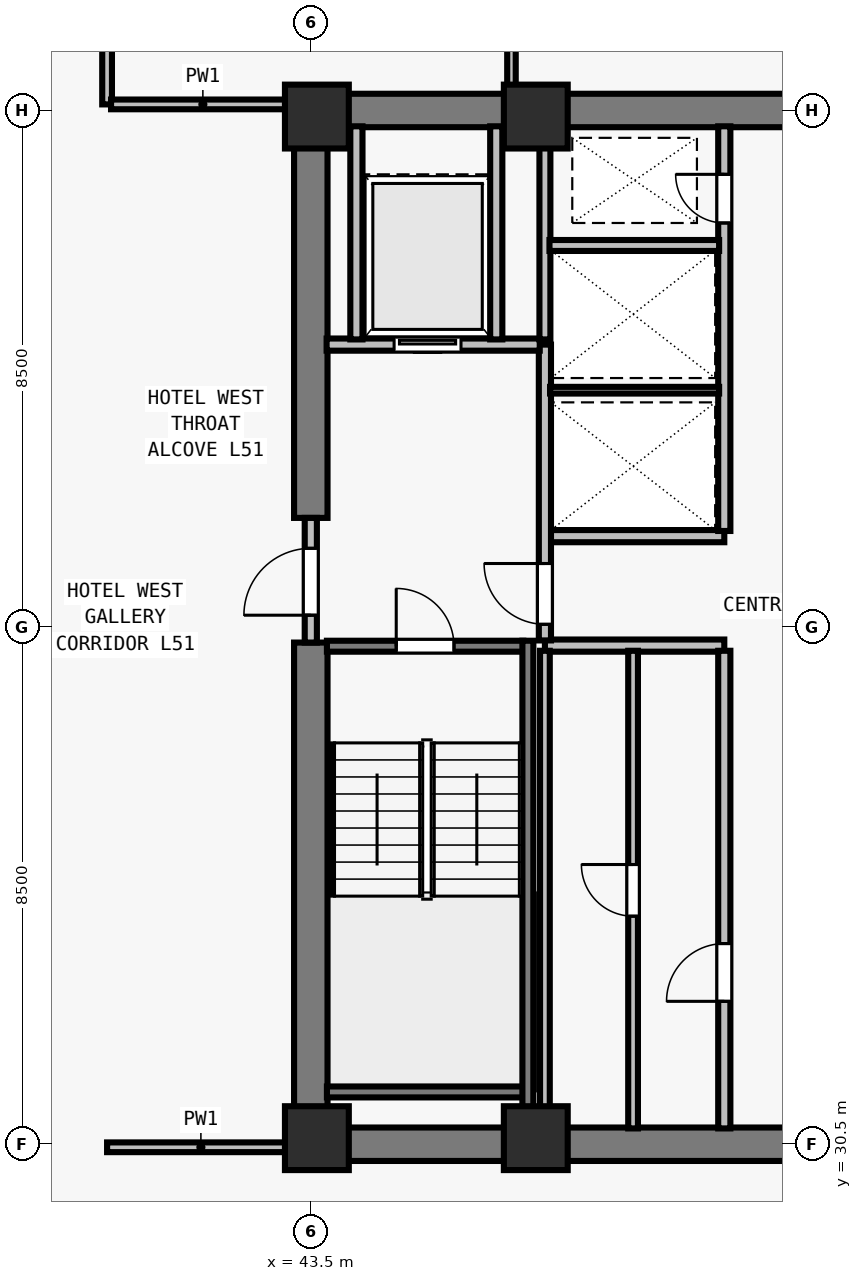
"""IFC4 building model, lengths in metres.
Left out: names, types, materials, properties, quantities, classifications, styles, units other than length and angle.
Written with IfcOpenShell. Run it as: python <this file> out.ifc"""

import sys

from ifc_helpers import new_model, si_unit, direction, frame, frame_2d, origin, origin_2d, place, context, subcontext, project, spatial, rectangle, extrude, element, fill, save


model = new_model("IFC4")
c1 = context("Model", 3, precision=1e-05, world=origin(), true_north=direction((0.0, 1.0)))
c2 = subcontext(c1, "Body", "Model", "MODEL_VIEW")
j1 = project(units=[si_unit("LENGTHUNIT", "METRE"), si_unit("PLANEANGLEUNIT", "RADIAN")], contexts=[c1])
p1 = place(None, origin())
s1 = spatial("IfcSite", under=j1, at=p1, CompositionType="ELEMENT")
p2 = place(p1, origin())
s2 = spatial("IfcBuilding", under=s1, at=p2, CompositionType="ELEMENT")
p3 = place(p2, frame((0.0, 0.0, 186.5)))
s3 = spatial("IfcBuildingStorey", under=s2, at=p3, CompositionType="ELEMENT", Elevation=186.5)
for number, where, z_axis, x_axis in (
    (1, (43.6, 30.6, 0.0), (0.0, 0.0, 1.0), (1.0, 0.0, 0.0)),
    (2, (47.2, 30.6, 0.0), (0.0, 0.0, 1.0), (1.0, 0.0, 0.0)),
    (3, (43.6, 47.4, 0.0), (0.0, 0.0, 1.0), (1.0, 0.0, 0.0)),
    (4, (47.2, 47.4, 0.0), (0.0, 0.0, 1.0), (1.0, 0.0, 0.0)),
):
    element("IfcColumn", number, at=place(p3, frame(where, z_axis=z_axis, x_axis=x_axis)), inside=s3, PredefinedType="COLUMN", context=c2, shape_type="SweptSolid", body=[
        extrude(rectangle(XDim=1.05, YDim=1.05, at=origin_2d()), origin(), (0.0, 0.0, 1.0), 3.5),
    ])
for number, where, z_axis, x_axis in (
    (5, (43.225, 30.5, 0.0), (0.0, 0.0, 1.0), (1.0, 0.0, 0.0)),
    (6, (43.225, 47.5, 0.0), (0.0, 0.0, 1.0), (1.0, 0.0, 0.0)),
):
    element("IfcWall", number, at=place(p3, frame(where, z_axis=z_axis, x_axis=x_axis)), inside=s3, PredefinedType="SHEAR", context=c2, shape_type="SweptSolid", body=[
        extrude(rectangle(XDim=17.55, YDim=0.55, at=frame_2d((8.775, 0.0))), origin(), (0.0, 0.0, 1.0), 3.28),
    ])
p4 = place(p3, frame((43.5, 30.765, 0.0), z_axis=(0.0, 0.0, 1.0), x_axis=(0.0, 1.0, 0.0)))
e7 = element("IfcWall", 7, at=p4, inside=s3, PredefinedType="SHEAR", context=c2, shape_type="SweptSolid", body=[
    extrude(rectangle(XDim=7.985, YDim=0.55, at=frame_2d((3.993, 0.0))), origin(), (0.0, 0.0, 1.0), 3.28),
])
p5 = place(p3, frame((43.5, 40.8, 0.0), z_axis=(0.0, 0.0, 1.0), x_axis=(0.0, 1.0, 0.0)))
e8 = element("IfcWall", 8, at=p5, inside=s3, PredefinedType="SHEAR", context=c2, shape_type="SweptSolid", body=[
    extrude(rectangle(XDim=6.435, YDim=0.55, at=frame_2d((3.218, 0.0))), origin(), (0.0, 0.0, 1.0), 3.28),
])
for number, where, z_axis, x_axis in (
    (9, (47.35, 38.7, 0.0), (0.0, 0.0, 1.0), (1.0, 0.0, 0.0)),
    (10, (47.35, 40.5, 0.0), (0.0, 0.0, 1.0), (1.0, 0.0, 0.0)),
):
    element("IfcWall", number, at=place(p3, frame(where, z_axis=z_axis, x_axis=x_axis)), inside=s3, PredefinedType="SOLIDWALL", context=c2, shape_type="SweptSolid", body=[
        extrude(rectangle(XDim=2.95, YDim=0.2, at=frame_2d((1.475, 0.0))), origin(), (0.0, 0.0, 1.0), 3.28),
    ])
p6 = place(p3, frame((50.3, 30.76, 0.0), z_axis=(0.0, 0.0, 1.0), x_axis=(0.0, 1.0, 0.0)))
e11 = element("IfcWall", 11, at=p6, inside=s3, PredefinedType="SOLIDWALL", context=c2, shape_type="SweptSolid", body=[
    extrude(rectangle(XDim=7.855, YDim=0.2, at=frame_2d((3.927, 0.0))), origin(), (0.0, 0.0, 1.0), 3.28),
])
p7 = place(p6, frame((2.09, 0.0, 0.0)))
e12 = element("IfcOpeningElement", 12, at=p7, cuts=e11, PredefinedType="OPENING", context=c2, shape_type="SweptSolid", body=[
    extrude(rectangle(XDim=0.95, YDim=2.12, at=frame_2d((0.475, 1.06))), frame((0.0, 0.11, 0.0), z_axis=(0.0, -1.0, 0.0), x_axis=(1.0, 0.0, 0.0)), (0.0, 0.0, 1.0), 0.22),
])
p8 = place(p3, frame((50.3, 40.585, 0.0), z_axis=(0.0, 0.0, 1.0), x_axis=(0.0, 1.0, 0.0)))
e13 = element("IfcWall", 13, at=p8, inside=s3, PredefinedType="SOLIDWALL", context=c2, shape_type="SweptSolid", body=[
    extrude(rectangle(XDim=6.655, YDim=0.2, at=frame_2d((3.328, 0.0))), origin(), (0.0, 0.0, 1.0), 3.28),
])
p9 = place(p8, frame((5.065, 0.0, 0.0)))
e14 = element("IfcOpeningElement", 14, at=p9, cuts=e13, PredefinedType="OPENING", context=c2, shape_type="SweptSolid", body=[
    extrude(rectangle(XDim=0.8, YDim=2.08, at=frame_2d((0.4, 1.04))), frame((0.0, 0.11, 0.0), z_axis=(0.0, -1.0, 0.0), x_axis=(1.0, 0.0, 0.0)), (0.0, 0.0, 1.0), 0.22),
])
p10 = place(p3, frame((43.5, 38.75, 0.0), z_axis=(0.0, 0.0, 1.0), x_axis=(0.0, 1.0, 0.0)))
e15 = element("IfcWall", 15, at=p10, inside=s3, PredefinedType="SOLIDWALL", context=c2, shape_type="SweptSolid", body=[
    extrude(rectangle(XDim=2.05, YDim=0.2, at=frame_2d((1.025, 0.0))), origin(), (0.0, 0.0, 1.0), 3.28),
])
p11 = place(p10, frame((0.45, 0.0, 0.0)))
e16 = element("IfcOpeningElement", 16, at=p11, cuts=e15, PredefinedType="OPENING", context=c2, shape_type="SweptSolid", body=[
    extrude(rectangle(XDim=1.1, YDim=2.15, at=frame_2d((0.55, 1.075))), frame((0.0, 0.11, 0.0), z_axis=(0.0, -1.0, 0.0), x_axis=(1.0, 0.0, 0.0)), (0.0, 0.0, 1.0), 0.22),
])
p12 = place(p3, frame((47.35, 38.785, 0.0), z_axis=(0.0, 0.0, 1.0), x_axis=(0.0, 1.0, 0.0)))
e17 = element("IfcWall", 17, at=p12, inside=s3, PredefinedType="SOLIDWALL", context=c2, shape_type="SweptSolid", body=[
    extrude(rectangle(XDim=4.865, YDim=0.2, at=frame_2d((2.433, 0.0))), origin(), (0.0, 0.0, 1.0), 3.28),
])
p13 = place(p12, frame((0.265, 0.0, 0.0)))
e18 = element("IfcOpeningElement", 18, at=p13, cuts=e17, PredefinedType="OPENING", context=c2, shape_type="SweptSolid", body=[
    extrude(rectangle(XDim=1.0, YDim=2.15, at=frame_2d((0.5, 1.075))), frame((0.0, 0.11, 0.0), z_axis=(0.0, -1.0, 0.0), x_axis=(1.0, 0.0, 0.0)), (0.0, 0.0, 1.0), 0.22),
])
p14 = place(p3, frame((43.76, 43.65, 0.0), z_axis=(0.0, 0.0, 1.0), x_axis=(1.0, 0.0, 0.0)))
e19 = element("IfcWall", 19, at=p14, inside=s3, PredefinedType="SOLIDWALL", context=c2, shape_type="SweptSolid", body=[
    extrude(rectangle(XDim=3.505, YDim=0.2, at=frame_2d((1.752, 0.0))), origin(), (0.0, 0.0, 1.0), 3.28),
])
p15 = place(p14, frame((1.11, 0.0, 0.0)))
e20 = element("IfcOpeningElement", 20, at=p15, cuts=e19, PredefinedType="OPENING", context=c2, shape_type="SweptSolid", body=[
    extrude(rectangle(XDim=1.1, YDim=2.2, at=frame_2d((0.55, 1.1))), frame((0.0, 0.11, 0.0), z_axis=(0.0, -1.0, 0.0), x_axis=(1.0, 0.0, 0.0)), (0.0, 0.0, 1.0), 0.22),
])
for number, where, z_axis, x_axis in (
    (21, (46.55, 43.735, 0.0), (0.0, 0.0, 1.0), (0.0, 1.0, 0.0)),
    (22, (44.25, 43.735, 0.0), (0.0, 0.0, 1.0), (0.0, 1.0, 0.0)),
):
    element("IfcWall", number, at=place(p3, frame(where, z_axis=z_axis, x_axis=x_axis)), inside=s3, PredefinedType="SOLIDWALL", context=c2, shape_type="SweptSolid", body=[
        extrude(rectangle(XDim=3.505, YDim=0.2, at=frame_2d((1.752, 0.0))), origin(), (0.0, 0.0, 1.0), 3.28),
    ])
p16 = place(p3, frame((47.35, 30.76, 0.0), z_axis=(0.0, 0.0, 1.0), x_axis=(0.0, 1.0, 0.0)))
e23 = element("IfcWall", 23, at=p16, inside=s3, PredefinedType="PARTITIONING", context=c2, shape_type="SweptSolid", body=[
    extrude(rectangle(XDim=7.855, YDim=0.16, at=frame_2d((3.927, 0.0))), origin(), (0.0, 0.0, 1.0), 3.28),
])
p17 = place(p3, frame((48.8, 30.76, 0.0), z_axis=(0.0, 0.0, 1.0), x_axis=(0.0, 1.0, 0.0)))
e24 = element("IfcWall", 24, at=p17, inside=s3, PredefinedType="PARTITIONING", context=c2, shape_type="SweptSolid", body=[
    extrude(rectangle(XDim=7.855, YDim=0.16, at=frame_2d((3.927, 0.0))), origin(), (0.0, 0.0, 1.0), 3.28),
])
p18 = place(p17, frame((3.49, 0.0, 0.0)))
e25 = element("IfcOpeningElement", 25, at=p18, cuts=e24, PredefinedType="OPENING", context=c2, shape_type="SweptSolid", body=[
    extrude(rectangle(XDim=0.85, YDim=2.12, at=frame_2d((0.425, 1.06))), frame((0.0, 0.09, 0.0), z_axis=(0.0, -1.0, 0.0), x_axis=(1.0, 0.0, 0.0)), (0.0, 0.0, 1.0), 0.18),
])
p19 = place(p3, frame((47.35, 43.735, 0.0), z_axis=(0.0, 0.0, 1.0), x_axis=(0.0, 1.0, 0.0)))
e26 = element("IfcWall", 26, at=p19, inside=s3, PredefinedType="SOLIDWALL", context=c2, shape_type="SweptSolid", body=[
    extrude(rectangle(XDim=3.505, YDim=0.18, at=frame_2d((1.752, 0.0))), origin(), (0.0, 0.0, 1.0), 3.28),
])
p20 = place(p3, frame((47.435, 42.9, 0.0), z_axis=(0.0, 0.0, 1.0), x_axis=(1.0, 0.0, 0.0)))
e27 = element("IfcWall", 27, at=p20, inside=s3, PredefinedType="PARTITIONING", context=c2, shape_type="SweptSolid", body=[
    extrude(rectangle(XDim=2.78, YDim=0.11, at=frame_2d((1.39, 0.0))), origin(), (0.0, 0.0, 1.0), 3.28),
])
p21 = place(p3, frame((47.425, 45.28, 0.0), z_axis=(0.0, 0.0, 1.0), x_axis=(1.0, 0.0, 0.0)))
e28 = element("IfcWall", 28, at=p21, inside=s3, PredefinedType="SOLIDWALL", context=c2, shape_type="SweptSolid", body=[
    extrude(rectangle(XDim=2.79, YDim=0.18, at=frame_2d((1.395, 0.0))), origin(), (0.0, 0.0, 1.0), 3.28),
])
p22 = place(p3, frame((40.15, 47.6, 0.0), z_axis=(0.0, 0.0, 1.0), x_axis=(0.0, 1.0, 0.0)))
e29 = element("IfcWall", 29, at=p22, inside=s3, PredefinedType="PARTITIONING", context=c2, shape_type="SweptSolid", body=[
    extrude(rectangle(XDim=15.075, YDim=0.16, at=frame_2d((7.538, 0.0))), origin(), (0.0, 0.0, 1.0), 2.555),
])
p23 = place(p22, frame((3.2, 0.0, 0.0)))
e30 = element("IfcOpeningElement", 30, at=p23, cuts=e29, PredefinedType="OPENING", context=c2, shape_type="SweptSolid", body=[
    extrude(rectangle(XDim=0.96, YDim=2.12, at=frame_2d((0.48, 1.06))), frame((0.0, 0.09, 0.0), z_axis=(0.0, -1.0, 0.0), x_axis=(1.0, 0.0, 0.0)), (0.0, 0.0, 1.0), 0.18),
])
p24 = place(p3, frame((40.15, 30.45, 0.0), z_axis=(0.0, 0.0, 1.0), x_axis=(1.0, 0.0, 0.0)))
e31 = element("IfcWall", 31, at=p24, inside=s3, PredefinedType="PARTITIONING", context=c2, shape_type="SweptSolid", body=[
    extrude(rectangle(XDim=3.085, YDim=0.16, at=frame_2d((1.542, 0.0))), origin(), (0.0, 0.0, 1.0), 3.28),
])
p25 = place(p3, frame((40.215, 47.6, 0.0), z_axis=(0.0, 0.0, 1.0), x_axis=(1.0, 0.0, 0.0)))
e32 = element("IfcWall", 32, at=p25, inside=s3, PredefinedType="PARTITIONING", context=c2, shape_type="SweptSolid", body=[
    extrude(rectangle(XDim=3.02, YDim=0.16, at=frame_2d((1.51, 0.0))), origin(), (0.0, 0.0, 1.0), 3.28),
])
p26 = place(p3, frame((46.8, 47.76, 0.0), z_axis=(0.0, 0.0, 1.0), x_axis=(0.0, 1.0, 0.0)))
e33 = element("IfcWall", 33, at=p26, inside=s3, PredefinedType="PARTITIONING", context=c2, shape_type="SweptSolid", body=[
    extrude(rectangle(XDim=14.915, YDim=0.14, at=frame_2d((7.458, 0.0))), origin(), (0.0, 0.0, 1.0), 3.28),
])
p27 = place(p26, frame((2.34, 0.0, 0.0)))
e34 = element("IfcOpeningElement", 34, at=p27, cuts=e33, PredefinedType="OPENING", context=c2, shape_type="SweptSolid", body=[
    extrude(rectangle(XDim=0.92, YDim=2.12, at=frame_2d((0.46, 1.06))), frame((0.0, 0.08, 0.0), z_axis=(0.0, -1.0, 0.0), x_axis=(1.0, 0.0, 0.0)), (0.0, 0.0, 1.0), 0.16),
])
p28 = place(p3, frame((43.765, 38.69, 0.0), z_axis=(0.0, 0.0, 1.0), x_axis=(1.0, 0.0, 0.0)))
e35 = element("IfcWall", 35, at=p28, inside=s3, PredefinedType="SOLIDWALL", context=c2, shape_type="SweptSolid", body=[
    extrude(rectangle(XDim=3.23, YDim=0.18, at=frame_2d((1.615, 0.0))), origin(), (0.0, 0.0, 1.0), 3.28),
])
p29 = place(p28, frame((1.14, 0.0, 0.0)))
e36 = element("IfcOpeningElement", 36, at=p29, cuts=e35, PredefinedType="OPENING", context=c2, shape_type="SweptSolid", body=[
    extrude(rectangle(XDim=0.95, YDim=2.15, at=frame_2d((0.475, 1.075))), frame((0.0, 0.1, 0.0), z_axis=(0.0, -1.0, 0.0), x_axis=(1.0, 0.0, 0.0)), (0.0, 0.0, 1.0), 0.2),
])
p30 = place(p3, frame((43.765, 31.36, 0.0), z_axis=(0.0, 0.0, 1.0), x_axis=(1.0, 0.0, 0.0)))
e37 = element("IfcWall", 37, at=p30, inside=s3, PredefinedType="SOLIDWALL", context=c2, shape_type="SweptSolid", body=[
    extrude(rectangle(XDim=3.23, YDim=0.18, at=frame_2d((1.615, 0.0))), origin(), (0.0, 0.0, 1.0), 3.28),
])
p31 = place(p3, frame((47.07, 38.78, 0.0), z_axis=(0.0, 0.0, 1.0), x_axis=(0.0, -1.0, 0.0)))
e38 = element("IfcWall", 38, at=p31, inside=s3, PredefinedType="SOLIDWALL", context=c2, shape_type="SweptSolid", body=[
    extrude(rectangle(XDim=8.017, YDim=0.18, at=frame_2d((4.009, 0.0))), origin(), (0.0, 0.0, 1.0), 3.28),
])
p32 = place(p11, origin())
e39 = element("IfcDoor", 39, at=p32, inside=s3, OperationType="SINGLE_SWING_LEFT", PredefinedType="DOOR", context=c2, shape_type="SweptSolid", body=[
    extrude(rectangle(XDim=1.1, YDim=2.15, at=frame_2d((0.55, 1.075))), frame((0.0, 0.025, 0.0), z_axis=(0.0, -1.0, 0.0), x_axis=(1.0, 0.0, 0.0)), (0.0, 0.0, 1.0), 0.05),
])
fill(e16, e39)
p33 = place(p13, origin())
e40 = element("IfcDoor", 40, at=p33, inside=s3, OperationType="SINGLE_SWING_RIGHT", PredefinedType="DOOR", context=c2, shape_type="SweptSolid", body=[
    extrude(rectangle(XDim=1.0, YDim=2.15, at=frame_2d((0.5, 1.075))), frame((0.0, 0.025, 0.0), z_axis=(0.0, -1.0, 0.0), x_axis=(1.0, 0.0, 0.0)), (0.0, 0.0, 1.0), 0.05),
])
fill(e18, e40)
p34 = place(p15, origin())
e41 = element("IfcDoor", 41, at=p34, inside=s3, OperationType="SLIDING_TO_LEFT", PredefinedType="DOOR", context=c2, shape_type="SweptSolid", body=[
    extrude(rectangle(XDim=1.1, YDim=2.2, at=frame_2d((0.55, 1.1))), frame((0.0, 0.025, 0.0), z_axis=(0.0, -1.0, 0.0), x_axis=(1.0, 0.0, 0.0)), (0.0, 0.0, 1.0), 0.05),
])
fill(e20, e41)
p35 = place(p7, origin())
e42 = element("IfcDoor", 42, at=p35, inside=s3, OperationType="SINGLE_SWING_LEFT", PredefinedType="DOOR", context=c2, shape_type="SweptSolid", body=[
    extrude(rectangle(XDim=0.95, YDim=2.12, at=frame_2d((0.475, 1.06))), frame((0.0, 0.025, 0.0), z_axis=(0.0, -1.0, 0.0), x_axis=(1.0, 0.0, 0.0)), (0.0, 0.0, 1.0), 0.05),
])
fill(e12, e42)
p36 = place(p18, origin())
e43 = element("IfcDoor", 43, at=p36, inside=s3, OperationType="SINGLE_SWING_RIGHT", PredefinedType="DOOR", context=c2, shape_type="SweptSolid", body=[
    extrude(rectangle(XDim=0.85, YDim=2.12, at=frame_2d((0.425, 1.06))), frame((0.0, 0.025, 0.0), z_axis=(0.0, -1.0, 0.0), x_axis=(1.0, 0.0, 0.0)), (0.0, 0.0, 1.0), 0.05),
])
fill(e25, e43)
p37 = place(p9, origin())
e44 = element("IfcDoor", 44, at=p37, inside=s3, OperationType="SINGLE_SWING_RIGHT", PredefinedType="DOOR", context=c2, shape_type="SweptSolid", body=[
    extrude(rectangle(XDim=0.8, YDim=2.08, at=frame_2d((0.4, 1.04))), frame((0.0, 0.025, 0.0), z_axis=(0.0, -1.0, 0.0), x_axis=(1.0, 0.0, 0.0)), (0.0, 0.0, 1.0), 0.05),
])
fill(e14, e44)
p38 = place(p29, origin())
e45 = element("IfcDoor", 45, at=p38, inside=s3, OperationType="SINGLE_SWING_LEFT", PredefinedType="DOOR", context=c2, shape_type="SweptSolid", body=[
    extrude(rectangle(XDim=0.95, YDim=2.15, at=frame_2d((0.475, 1.075))), frame((0.0, 0.025, 0.0), z_axis=(0.0, -1.0, 0.0), x_axis=(1.0, 0.0, 0.0)), (0.0, 0.0, 1.0), 0.05),
])
fill(e36, e45)
save(model, sys.argv[1])
